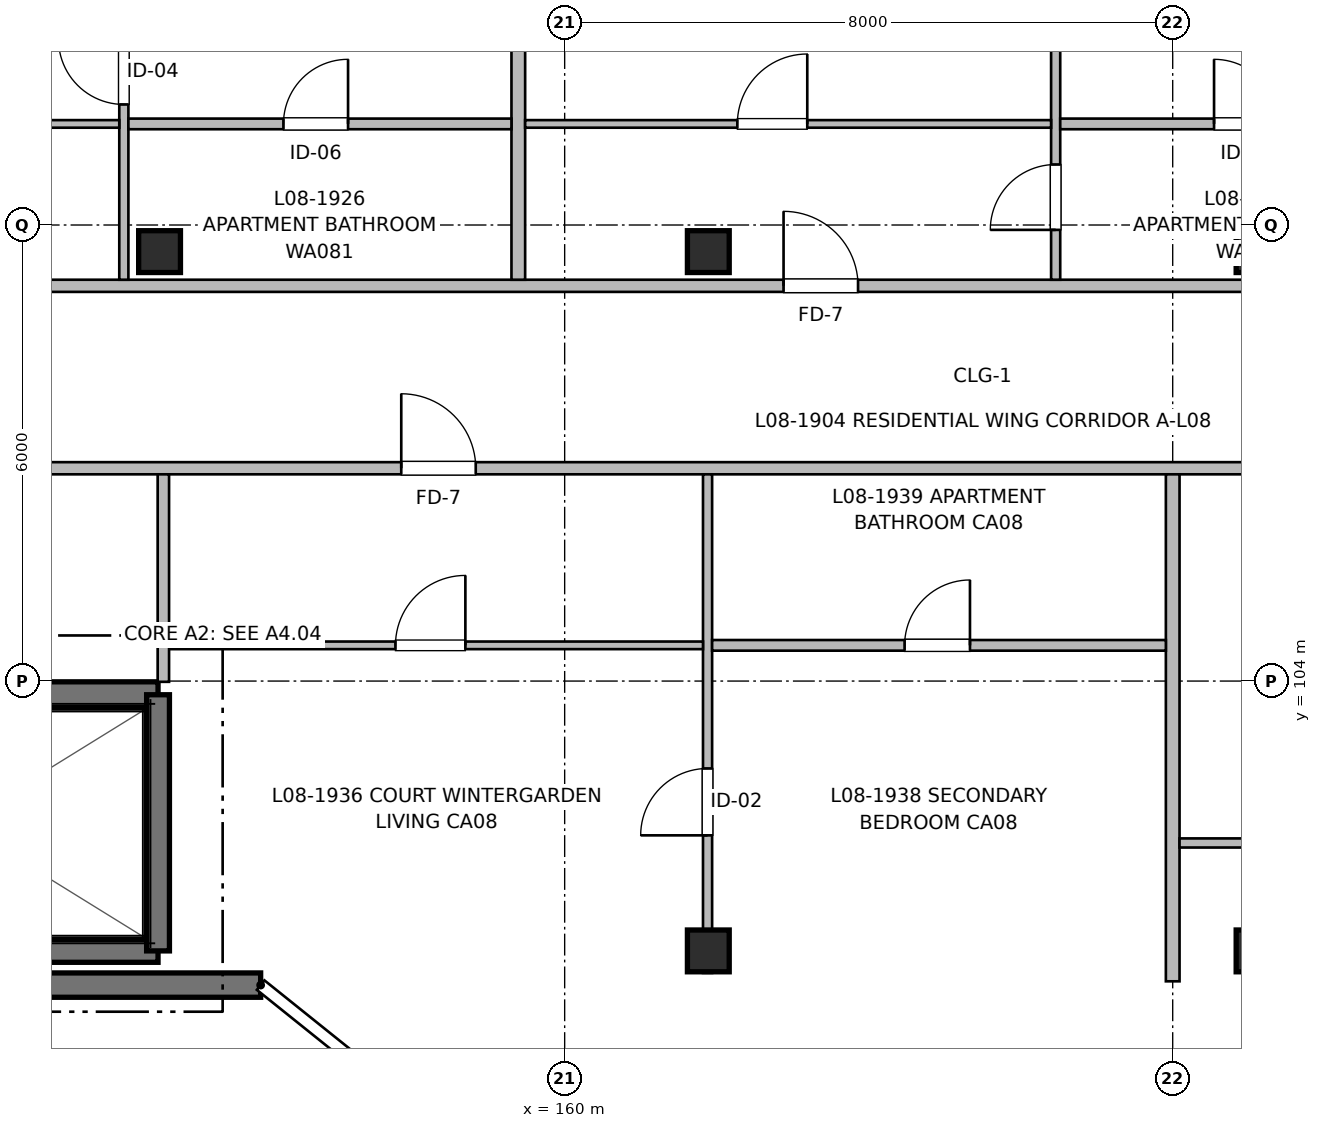
"""IFC4 building model, lengths in metres.
Left out: names, types, materials, properties, quantities, classifications, styles, units other than length and angle.
Written with IfcOpenShell. Run it as: python <this file> out.ifc"""

import sys

from ifc_helpers import new_model, si_unit, direction, frame, frame_2d, origin, origin_2d, place, context, subcontext, project, spatial, rectangle, extrude, element, fill, save


model = new_model("IFC4")
c1 = context("Model", 3, precision=1e-05, world=origin(), true_north=direction((0.0, 1.0)))
c2 = subcontext(c1, "Body", "Model", "MODEL_VIEW")
j1 = project(units=[si_unit("LENGTHUNIT", "METRE"), si_unit("PLANEANGLEUNIT", "RADIAN")], contexts=[c1])
p1 = place(None, origin())
s1 = spatial("IfcSite", under=j1, at=p1, CompositionType="ELEMENT")
p2 = place(p1, origin())
s2 = spatial("IfcBuilding", under=s1, at=p2, CompositionType="ELEMENT")
p3 = place(p2, frame((0.0, 0.0, 26.56)))
s3 = spatial("IfcBuildingStorey", under=s2, at=p3, CompositionType="ELEMENT", Elevation=26.56)
for number, where, z_axis, x_axis in (
    (1, (154.67, 109.65, 0.0), (0.0, 0.0, 1.0), (1.0, 0.0, 0.0)),
    (2, (161.89, 100.45, 0.0), (0.0, 0.0, 1.0), (1.0, 0.0, 0.0)),
    (3, (161.89, 109.65, 0.0), (0.0, 0.0, 1.0), (1.0, 0.0, 0.0)),
    (4, (169.11, 100.45, 0.0), (0.0, 0.0, 1.0), (1.0, 0.0, 0.0)),
    (5, (169.11, 109.65, 0.0), (0.0, 0.0, 1.0), (1.0, 0.0, 0.0)),
):
    element("IfcColumn", number, at=place(p3, frame(where, z_axis=z_axis, x_axis=x_axis)), inside=s3, PredefinedType="COLUMN", context=c2, shape_type="SweptSolid", body=[
        extrude(rectangle(XDim=0.55, YDim=0.55, at=origin_2d()), origin(), (0.0, 0.0, 1.0), 3.2),
    ])
p4 = place(p3, frame((147.75, 100.45, 0.0), z_axis=(0.0, 0.0, 1.0), x_axis=(1.0, 0.0, 0.0)))
e6 = element("IfcWall", 6, at=p4, inside=s3, PredefinedType="SHEAR", context=c2, shape_type="SweptSolid", body=[
    extrude(rectangle(XDim=6.9, YDim=0.3, at=frame_2d((3.45, 0.0))), origin(), (0.0, 0.0, 1.0), 3.2),
])
p5 = place(p3, frame((154.65, 103.82, 0.0), z_axis=(0.0, 0.0, 1.0), x_axis=(-1.0, 0.0, 0.0)))
e7 = element("IfcWall", 7, at=p5, inside=s3, PredefinedType="SHEAR", context=c2, shape_type="SweptSolid", body=[
    extrude(rectangle(XDim=6.9, YDim=0.34, at=frame_2d((3.45, 0.0))), origin(), (0.0, 0.0, 1.0), 3.2),
])
p6 = place(p5, frame((5.25, 0.0, 0.0)))
e8 = element("IfcOpeningElement", 8, at=p6, cuts=e7, PredefinedType="OPENING", context=c2, shape_type="SweptSolid", body=[
    extrude(rectangle(XDim=1.05, YDim=2.15, at=frame_2d((0.525, 1.075))), frame((0.0, 0.18, 0.0), z_axis=(0.0, -1.0, 0.0), x_axis=(1.0, 0.0, 0.0)), (0.0, 0.0, 1.0), 0.36),
])
p7 = place(p3, frame((154.65, 100.45, 0.0), z_axis=(0.0, 0.0, 1.0), x_axis=(0.0, 1.0, 0.0)))
e9 = element("IfcWall", 9, at=p7, inside=s3, PredefinedType="SHEAR", context=c2, shape_type="SweptSolid", body=[
    extrude(rectangle(XDim=3.37, YDim=0.3, at=frame_2d((1.685, 0.0))), origin(), (0.0, 0.0, 1.0), 3.2),
])
p8 = place(p3, frame((156.0, 100.0, 0.0), z_axis=(0.0, 0.0, 1.0), x_axis=(-1.0, 0.0, 0.0)))
e10 = element("IfcWall", 10, at=p8, inside=s3, PredefinedType="SHEAR", context=c2, shape_type="SweptSolid", body=[
    extrude(rectangle(XDim=9.0, YDim=0.32, at=frame_2d((4.5, 0.0))), origin(), (0.0, 0.0, 1.0), 2.98),
])
p9 = place(p8, frame((3.875, 0.0, 0.87)))
e11 = element("IfcOpeningElement", 11, at=p9, cuts=e10, PredefinedType="OPENING", context=c2, shape_type="SweptSolid", body=[
    extrude(rectangle(XDim=1.25, YDim=1.35, at=frame_2d((0.625, 0.675))), frame((0.0, 0.17, 0.0), z_axis=(0.0, -1.0, 0.0), x_axis=(1.0, 0.0, 0.0)), (0.0, 0.0, 1.0), 0.34),
])
p10 = place(p3, frame((147.16, 106.8, 0.0), z_axis=(0.0, 0.0, 1.0), x_axis=(1.0, 0.0, 0.0)))
e12 = element("IfcWall", 12, at=p10, inside=s3, PredefinedType="PARTITIONING", context=c2, shape_type="SweptSolid", body=[
    extrude(rectangle(XDim=27.64, YDim=0.16, at=frame_2d((13.82, 0.0))), origin(), (0.0, 0.0, 1.0), 2.935),
])
p11 = place(p10, frame((3.515, 0.0, 0.0)))
e13 = element("IfcOpeningElement", 13, at=p11, cuts=e12, PredefinedType="OPENING", context=c2, shape_type="SweptSolid", body=[
    extrude(rectangle(XDim=1.05, YDim=2.15, at=frame_2d((0.525, 1.075))), frame((0.0, 0.09, 0.0), z_axis=(0.0, -1.0, 0.0), x_axis=(1.0, 0.0, 0.0)), (0.0, 0.0, 1.0), 0.18),
])
p12 = place(p10, frame((10.69, 0.0, 0.0)))
e14 = element("IfcOpeningElement", 14, at=p12, cuts=e12, PredefinedType="OPENING", context=c2, shape_type="SweptSolid", body=[
    extrude(rectangle(XDim=0.98, YDim=2.15, at=frame_2d((0.49, 1.075))), frame((0.0, 0.09, 0.0), z_axis=(0.0, -1.0, 0.0), x_axis=(1.0, 0.0, 0.0)), (0.0, 0.0, 1.0), 0.18),
])
p13 = place(p3, frame((147.16, 109.2, 0.0), z_axis=(0.0, 0.0, 1.0), x_axis=(1.0, 0.0, 0.0)))
e15 = element("IfcWall", 15, at=p13, inside=s3, PredefinedType="PARTITIONING", context=c2, shape_type="SweptSolid", body=[
    extrude(rectangle(XDim=36.68, YDim=0.16, at=frame_2d((18.34, 0.0))), origin(), (0.0, 0.0, 1.0), 2.935),
])
p14 = place(p13, frame((3.03, 0.0, 0.0)))
e16 = element("IfcOpeningElement", 16, at=p14, cuts=e15, PredefinedType="OPENING", context=c2, shape_type="SweptSolid", body=[
    extrude(rectangle(XDim=0.98, YDim=2.15, at=frame_2d((0.49, 1.075))), frame((0.0, 0.09, 0.0), z_axis=(0.0, -1.0, 0.0), x_axis=(1.0, 0.0, 0.0)), (0.0, 0.0, 1.0), 0.18),
])
p15 = place(p13, frame((15.72, 0.0, 0.0)))
e17 = element("IfcOpeningElement", 17, at=p15, cuts=e15, PredefinedType="OPENING", context=c2, shape_type="SweptSolid", body=[
    extrude(rectangle(XDim=0.98, YDim=2.15, at=frame_2d((0.49, 1.075))), frame((0.0, 0.09, 0.0), z_axis=(0.0, -1.0, 0.0), x_axis=(1.0, 0.0, 0.0)), (0.0, 0.0, 1.0), 0.18),
])
p16 = place(p13, frame((27.17, 0.0, 0.0)))
e18 = element("IfcOpeningElement", 18, at=p16, cuts=e15, PredefinedType="OPENING", context=c2, shape_type="SweptSolid", body=[
    extrude(rectangle(XDim=0.98, YDim=2.15, at=frame_2d((0.49, 1.075))), frame((0.0, 0.09, 0.0), z_axis=(0.0, -1.0, 0.0), x_axis=(1.0, 0.0, 0.0)), (0.0, 0.0, 1.0), 0.18),
])
p17 = place(p3, frame((168.0, 100.05, 0.0), z_axis=(0.0, 0.0, 1.0), x_axis=(0.0, 1.0, 0.0)))
e19 = element("IfcWall", 19, at=p17, inside=s3, PredefinedType="PARTITIONING", context=c2, shape_type="SweptSolid", body=[
    extrude(rectangle(XDim=6.67, YDim=0.18, at=frame_2d((3.335, 0.0))), origin(), (0.0, 0.0, 1.0), 2.935),
])
p18 = place(p3, frame((154.72, 103.99, 0.0), z_axis=(0.0, 0.0, 1.0), x_axis=(0.0, 1.0, 0.0)))
e20 = element("IfcWall", 20, at=p18, inside=s3, PredefinedType="PARTITIONING", context=c2, shape_type="SweptSolid", body=[
    extrude(rectangle(XDim=2.73, YDim=0.15, at=frame_2d((1.365, 0.0))), origin(), (0.0, 0.0, 1.0), 2.935),
])
p19 = place(p3, frame((168.09, 101.87, 0.0), z_axis=(0.0, 0.0, 1.0), x_axis=(1.0, 0.0, 0.0)))
e21 = element("IfcWall", 21, at=p19, inside=s3, PredefinedType="PARTITIONING", context=c2, shape_type="SweptSolid", body=[
    extrude(rectangle(XDim=4.19, YDim=0.12, at=frame_2d((2.095, 0.0))), origin(), (0.0, 0.0, 1.0), 2.935),
])
p20 = place(p19, frame((2.045, 0.0, 0.0)))
e22 = element("IfcOpeningElement", 22, at=p20, cuts=e21, PredefinedType="OPENING", context=c2, shape_type="SweptSolid", body=[
    extrude(rectangle(XDim=0.9, YDim=2.1, at=frame_2d((0.45, 1.05))), frame((0.0, 0.07, 0.0), z_axis=(0.0, -1.0, 0.0), x_axis=(1.0, 0.0, 0.0)), (0.0, 0.0, 1.0), 0.14),
])
p21 = place(p3, frame((159.39, 109.28, 0.0), z_axis=(0.0, 0.0, 1.0), x_axis=(0.0, 1.0, 0.0)))
e23 = element("IfcWall", 23, at=p21, inside=s3, PredefinedType="PARTITIONING", context=c2, shape_type="SweptSolid", body=[
    extrude(rectangle(XDim=6.6, YDim=0.18, at=frame_2d((3.3, 0.0))), origin(), (0.0, 0.0, 1.0), 2.935),
])
p22 = place(p3, frame((154.2, 109.28, 0.0), z_axis=(0.0, 0.0, 1.0), x_axis=(0.0, 1.0, 0.0)))
e24 = element("IfcWall", 24, at=p22, inside=s3, PredefinedType="PARTITIONING", context=c2, shape_type="SweptSolid", body=[
    extrude(rectangle(XDim=6.6, YDim=0.12, at=frame_2d((3.3, 0.0))), origin(), (0.0, 0.0, 1.0), 2.935),
])
p23 = place(p22, frame((2.306, 0.0, 0.0)))
e25 = element("IfcOpeningElement", 25, at=p23, cuts=e24, PredefinedType="OPENING", context=c2, shape_type="SweptSolid", body=[
    extrude(rectangle(XDim=0.86, YDim=2.1, at=frame_2d((0.43, 1.05))), frame((0.0, 0.07, 0.0), z_axis=(0.0, -1.0, 0.0), x_axis=(1.0, 0.0, 0.0)), (0.0, 0.0, 1.0), 0.14),
])
p24 = place(p22, frame((4.097, 0.0, 0.0)))
e26 = element("IfcOpeningElement", 26, at=p24, cuts=e24, PredefinedType="OPENING", context=c2, shape_type="SweptSolid", body=[
    extrude(rectangle(XDim=0.9, YDim=2.1, at=frame_2d((0.45, 1.05))), frame((0.0, 0.07, 0.0), z_axis=(0.0, -1.0, 0.0), x_axis=(1.0, 0.0, 0.0)), (0.0, 0.0, 1.0), 0.14),
])
p25 = place(p3, frame((154.26, 111.33, 0.0), z_axis=(0.0, 0.0, 1.0), x_axis=(1.0, 0.0, 0.0)))
e27 = element("IfcWall", 27, at=p25, inside=s3, PredefinedType="PARTITIONING", context=c2, shape_type="SweptSolid", body=[
    extrude(rectangle(XDim=5.04, YDim=0.14, at=frame_2d((2.52, 0.0))), origin(), (0.0, 0.0, 1.0), 2.935),
])
p26 = place(p25, frame((2.04, 0.0, 0.0)))
e28 = element("IfcOpeningElement", 28, at=p26, cuts=e27, PredefinedType="OPENING", context=c2, shape_type="SweptSolid", body=[
    extrude(rectangle(XDim=0.85, YDim=2.05, at=frame_2d((0.425, 1.025))), frame((0.0, 0.08, 0.0), z_axis=(0.0, -1.0, 0.0), x_axis=(1.0, 0.0, 0.0)), (0.0, 0.0, 1.0), 0.16),
])
p27 = place(p3, frame((147.16, 111.33, 0.0), z_axis=(0.0, 0.0, 1.0), x_axis=(1.0, 0.0, 0.0)))
e29 = element("IfcWall", 29, at=p27, inside=s3, PredefinedType="PARTITIONING", context=c2, shape_type="SweptSolid", body=[
    extrude(rectangle(XDim=6.98, YDim=0.1, at=frame_2d((3.49, 0.0))), origin(), (0.0, 0.0, 1.0), 2.935),
])
p28 = place(p27, frame((2.816, 0.0, 0.0)))
e30 = element("IfcOpeningElement", 30, at=p28, cuts=e29, PredefinedType="OPENING", context=c2, shape_type="SweptSolid", body=[
    extrude(rectangle(XDim=0.92, YDim=2.1, at=frame_2d((0.46, 1.05))), frame((0.0, 0.06, 0.0), z_axis=(0.0, -1.0, 0.0), x_axis=(1.0, 0.0, 0.0)), (0.0, 0.0, 1.0), 0.12),
])
p29 = place(p3, frame((166.46, 109.28, 0.0), z_axis=(0.0, 0.0, 1.0), x_axis=(0.0, 1.0, 0.0)))
e31 = element("IfcWall", 31, at=p29, inside=s3, PredefinedType="PARTITIONING", context=c2, shape_type="SweptSolid", body=[
    extrude(rectangle(XDim=6.6, YDim=0.12, at=frame_2d((3.3, 0.0))), origin(), (0.0, 0.0, 1.0), 2.935),
])
p30 = place(p29, frame((0.656, 0.0, 0.0)))
e32 = element("IfcOpeningElement", 32, at=p30, cuts=e31, PredefinedType="OPENING", context=c2, shape_type="SweptSolid", body=[
    extrude(rectangle(XDim=0.86, YDim=2.1, at=frame_2d((0.43, 1.05))), frame((0.0, 0.07, 0.0), z_axis=(0.0, -1.0, 0.0), x_axis=(1.0, 0.0, 0.0)), (0.0, 0.0, 1.0), 0.14),
])
p31 = place(p29, frame((4.097, 0.0, 0.0)))
e33 = element("IfcOpeningElement", 33, at=p31, cuts=e31, PredefinedType="OPENING", context=c2, shape_type="SweptSolid", body=[
    extrude(rectangle(XDim=0.9, YDim=2.1, at=frame_2d((0.45, 1.05))), frame((0.0, 0.07, 0.0), z_axis=(0.0, -1.0, 0.0), x_axis=(1.0, 0.0, 0.0)), (0.0, 0.0, 1.0), 0.14),
])
p32 = place(p3, frame((166.52, 111.33, 0.0), z_axis=(0.0, 0.0, 1.0), x_axis=(1.0, 0.0, 0.0)))
e34 = element("IfcWall", 34, at=p32, inside=s3, PredefinedType="PARTITIONING", context=c2, shape_type="SweptSolid", body=[
    extrude(rectangle(XDim=5.0, YDim=0.14, at=frame_2d((2.5, 0.0))), origin(), (0.0, 0.0, 1.0), 2.935),
])
p33 = place(p32, frame((2.024, 0.0, 0.0)))
e35 = element("IfcOpeningElement", 35, at=p33, cuts=e34, PredefinedType="OPENING", context=c2, shape_type="SweptSolid", body=[
    extrude(rectangle(XDim=0.85, YDim=2.05, at=frame_2d((0.425, 1.025))), frame((0.0, 0.08, 0.0), z_axis=(0.0, -1.0, 0.0), x_axis=(1.0, 0.0, 0.0)), (0.0, 0.0, 1.0), 0.16),
])
p34 = place(p3, frame((159.48, 111.33, 0.0), z_axis=(0.0, 0.0, 1.0), x_axis=(1.0, 0.0, 0.0)))
e36 = element("IfcWall", 36, at=p34, inside=s3, PredefinedType="PARTITIONING", context=c2, shape_type="SweptSolid", body=[
    extrude(rectangle(XDim=6.92, YDim=0.1, at=frame_2d((3.46, 0.0))), origin(), (0.0, 0.0, 1.0), 2.935),
])
p35 = place(p34, frame((2.792, 0.0, 0.0)))
e37 = element("IfcOpeningElement", 37, at=p35, cuts=e36, PredefinedType="OPENING", context=c2, shape_type="SweptSolid", body=[
    extrude(rectangle(XDim=0.92, YDim=2.1, at=frame_2d((0.46, 1.05))), frame((0.0, 0.06, 0.0), z_axis=(0.0, -1.0, 0.0), x_axis=(1.0, 0.0, 0.0)), (0.0, 0.0, 1.0), 0.12),
])
p36 = place(p3, frame((161.88, 100.16, 0.0), z_axis=(0.0, 0.0, 1.0), x_axis=(0.0, 1.0, 0.0)))
e38 = element("IfcWall", 38, at=p36, inside=s3, PredefinedType="PARTITIONING", context=c2, shape_type="SweptSolid", body=[
    extrude(rectangle(XDim=6.56, YDim=0.12, at=frame_2d((3.28, 0.0))), origin(), (0.0, 0.0, 1.0), 2.68),
])
p37 = place(p36, frame((1.81, 0.0, 0.0)))
e39 = element("IfcOpeningElement", 39, at=p37, cuts=e38, PredefinedType="OPENING", context=c2, shape_type="SweptSolid", body=[
    extrude(rectangle(XDim=0.88, YDim=2.1, at=frame_2d((0.44, 1.05))), frame((0.0, 0.07, 0.0), z_axis=(0.0, -1.0, 0.0), x_axis=(1.0, 0.0, 0.0)), (0.0, 0.0, 1.0), 0.14),
])
p38 = place(p3, frame((161.94, 104.47, 0.0), z_axis=(0.0, 0.0, 1.0), x_axis=(1.0, 0.0, 0.0)))
e40 = element("IfcWall", 40, at=p38, inside=s3, PredefinedType="PARTITIONING", context=c2, shape_type="SweptSolid", body=[
    extrude(rectangle(XDim=5.97, YDim=0.14, at=frame_2d((2.985, 0.0))), origin(), (0.0, 0.0, 1.0), 2.935),
])
p39 = place(p38, frame((2.533, 0.0, 0.0)))
e41 = element("IfcOpeningElement", 41, at=p39, cuts=e40, PredefinedType="OPENING", context=c2, shape_type="SweptSolid", body=[
    extrude(rectangle(XDim=0.86, YDim=2.1, at=frame_2d((0.43, 1.05))), frame((0.0, 0.08, 0.0), z_axis=(0.0, -1.0, 0.0), x_axis=(1.0, 0.0, 0.0)), (0.0, 0.0, 1.0), 0.16),
])
p40 = place(p3, frame((154.8, 104.47, 0.0), z_axis=(0.0, 0.0, 1.0), x_axis=(1.0, 0.0, 0.0)))
e42 = element("IfcWall", 42, at=p40, inside=s3, PredefinedType="PARTITIONING", context=c2, shape_type="SweptSolid", body=[
    extrude(rectangle(XDim=7.02, YDim=0.1, at=frame_2d((3.51, 0.0))), origin(), (0.0, 0.0, 1.0), 2.935),
])
p41 = place(p40, frame((2.974, 0.0, 0.0)))
e43 = element("IfcOpeningElement", 43, at=p41, cuts=e42, PredefinedType="OPENING", context=c2, shape_type="SweptSolid", body=[
    extrude(rectangle(XDim=0.92, YDim=2.1, at=frame_2d((0.46, 1.05))), frame((0.0, 0.06, 0.0), z_axis=(0.0, -1.0, 0.0), x_axis=(1.0, 0.0, 0.0)), (0.0, 0.0, 1.0), 0.12),
])
p42 = place(p23, origin())
e44 = element("IfcDoor", 44, at=p42, inside=s3, OperationType="SINGLE_SWING_RIGHT", PredefinedType="DOOR", context=c2, shape_type="SweptSolid", body=[
    extrude(rectangle(XDim=0.86, YDim=2.1, at=frame_2d((0.43, 1.05))), frame((0.0, 0.025, 0.0), z_axis=(0.0, -1.0, 0.0), x_axis=(1.0, 0.0, 0.0)), (0.0, 0.0, 1.0), 0.05),
])
fill(e25, e44)
p43 = place(p26, origin())
e45 = element("IfcDoor", 45, at=p43, inside=s3, OperationType="SINGLE_SWING_RIGHT", PredefinedType="DOOR", context=c2, shape_type="SweptSolid", body=[
    extrude(rectangle(XDim=0.85, YDim=2.05, at=frame_2d((0.425, 1.025))), frame((0.0, 0.025, 0.0), z_axis=(0.0, -1.0, 0.0), x_axis=(1.0, 0.0, 0.0)), (0.0, 0.0, 1.0), 0.05),
])
fill(e28, e45)
p44 = place(p15, origin())
e46 = element("IfcDoor", 46, at=p44, inside=s3, OperationType="SINGLE_SWING_LEFT", PredefinedType="DOOR", context=c2, shape_type="SweptSolid", body=[
    extrude(rectangle(XDim=0.98, YDim=2.15, at=frame_2d((0.49, 1.075))), frame((0.0, 0.025, 0.0), z_axis=(0.0, -1.0, 0.0), x_axis=(1.0, 0.0, 0.0)), (0.0, 0.0, 1.0), 0.05),
])
fill(e17, e46)
p45 = place(p35, origin())
e47 = element("IfcDoor", 47, at=p45, inside=s3, OperationType="SINGLE_SWING_RIGHT", PredefinedType="DOOR", context=c2, shape_type="SweptSolid", body=[
    extrude(rectangle(XDim=0.92, YDim=2.1, at=frame_2d((0.46, 1.05))), frame((0.0, 0.025, 0.0), z_axis=(0.0, -1.0, 0.0), x_axis=(1.0, 0.0, 0.0)), (0.0, 0.0, 1.0), 0.05),
])
fill(e37, e47)
p46 = place(p30, origin())
e48 = element("IfcDoor", 48, at=p46, inside=s3, OperationType="SINGLE_SWING_LEFT", PredefinedType="DOOR", context=c2, shape_type="SweptSolid", body=[
    extrude(rectangle(XDim=0.86, YDim=2.1, at=frame_2d((0.43, 1.05))), frame((0.0, 0.025, 0.0), z_axis=(0.0, -1.0, 0.0), x_axis=(1.0, 0.0, 0.0)), (0.0, 0.0, 1.0), 0.05),
])
fill(e32, e48)
p47 = place(p33, origin())
e49 = element("IfcDoor", 49, at=p47, inside=s3, OperationType="SINGLE_SWING_LEFT", PredefinedType="DOOR", context=c2, shape_type="SweptSolid", body=[
    extrude(rectangle(XDim=0.85, YDim=2.05, at=frame_2d((0.425, 1.025))), frame((0.0, 0.025, 0.0), z_axis=(0.0, -1.0, 0.0), x_axis=(1.0, 0.0, 0.0)), (0.0, 0.0, 1.0), 0.05),
])
fill(e35, e49)
p48 = place(p12, origin())
e50 = element("IfcDoor", 50, at=p48, inside=s3, OperationType="SINGLE_SWING_LEFT", PredefinedType="DOOR", context=c2, shape_type="SweptSolid", body=[
    extrude(rectangle(XDim=0.98, YDim=2.15, at=frame_2d((0.49, 1.075))), frame((0.0, 0.025, 0.0), z_axis=(0.0, -1.0, 0.0), x_axis=(1.0, 0.0, 0.0)), (0.0, 0.0, 1.0), 0.05),
])
fill(e14, e50)
p49 = place(p41, origin())
e51 = element("IfcDoor", 51, at=p49, inside=s3, OperationType="SINGLE_SWING_RIGHT", PredefinedType="DOOR", context=c2, shape_type="SweptSolid", body=[
    extrude(rectangle(XDim=0.92, YDim=2.1, at=frame_2d((0.46, 1.05))), frame((0.0, 0.025, 0.0), z_axis=(0.0, -1.0, 0.0), x_axis=(1.0, 0.0, 0.0)), (0.0, 0.0, 1.0), 0.05),
])
fill(e43, e51)
p50 = place(p37, origin())
e52 = element("IfcDoor", 52, at=p50, inside=s3, OperationType="SINGLE_SWING_LEFT", PredefinedType="DOOR", context=c2, shape_type="SweptSolid", body=[
    extrude(rectangle(XDim=0.88, YDim=2.1, at=frame_2d((0.44, 1.05))), frame((0.0, 0.025, 0.0), z_axis=(0.0, -1.0, 0.0), x_axis=(1.0, 0.0, 0.0)), (0.0, 0.0, 1.0), 0.05),
])
fill(e39, e52)
p51 = place(p39, origin())
e53 = element("IfcDoor", 53, at=p51, inside=s3, OperationType="SINGLE_SWING_RIGHT", PredefinedType="DOOR", context=c2, shape_type="SweptSolid", body=[
    extrude(rectangle(XDim=0.86, YDim=2.1, at=frame_2d((0.43, 1.05))), frame((0.0, 0.025, 0.0), z_axis=(0.0, -1.0, 0.0), x_axis=(1.0, 0.0, 0.0)), (0.0, 0.0, 1.0), 0.05),
])
fill(e41, e53)
save(model, sys.argv[1])
